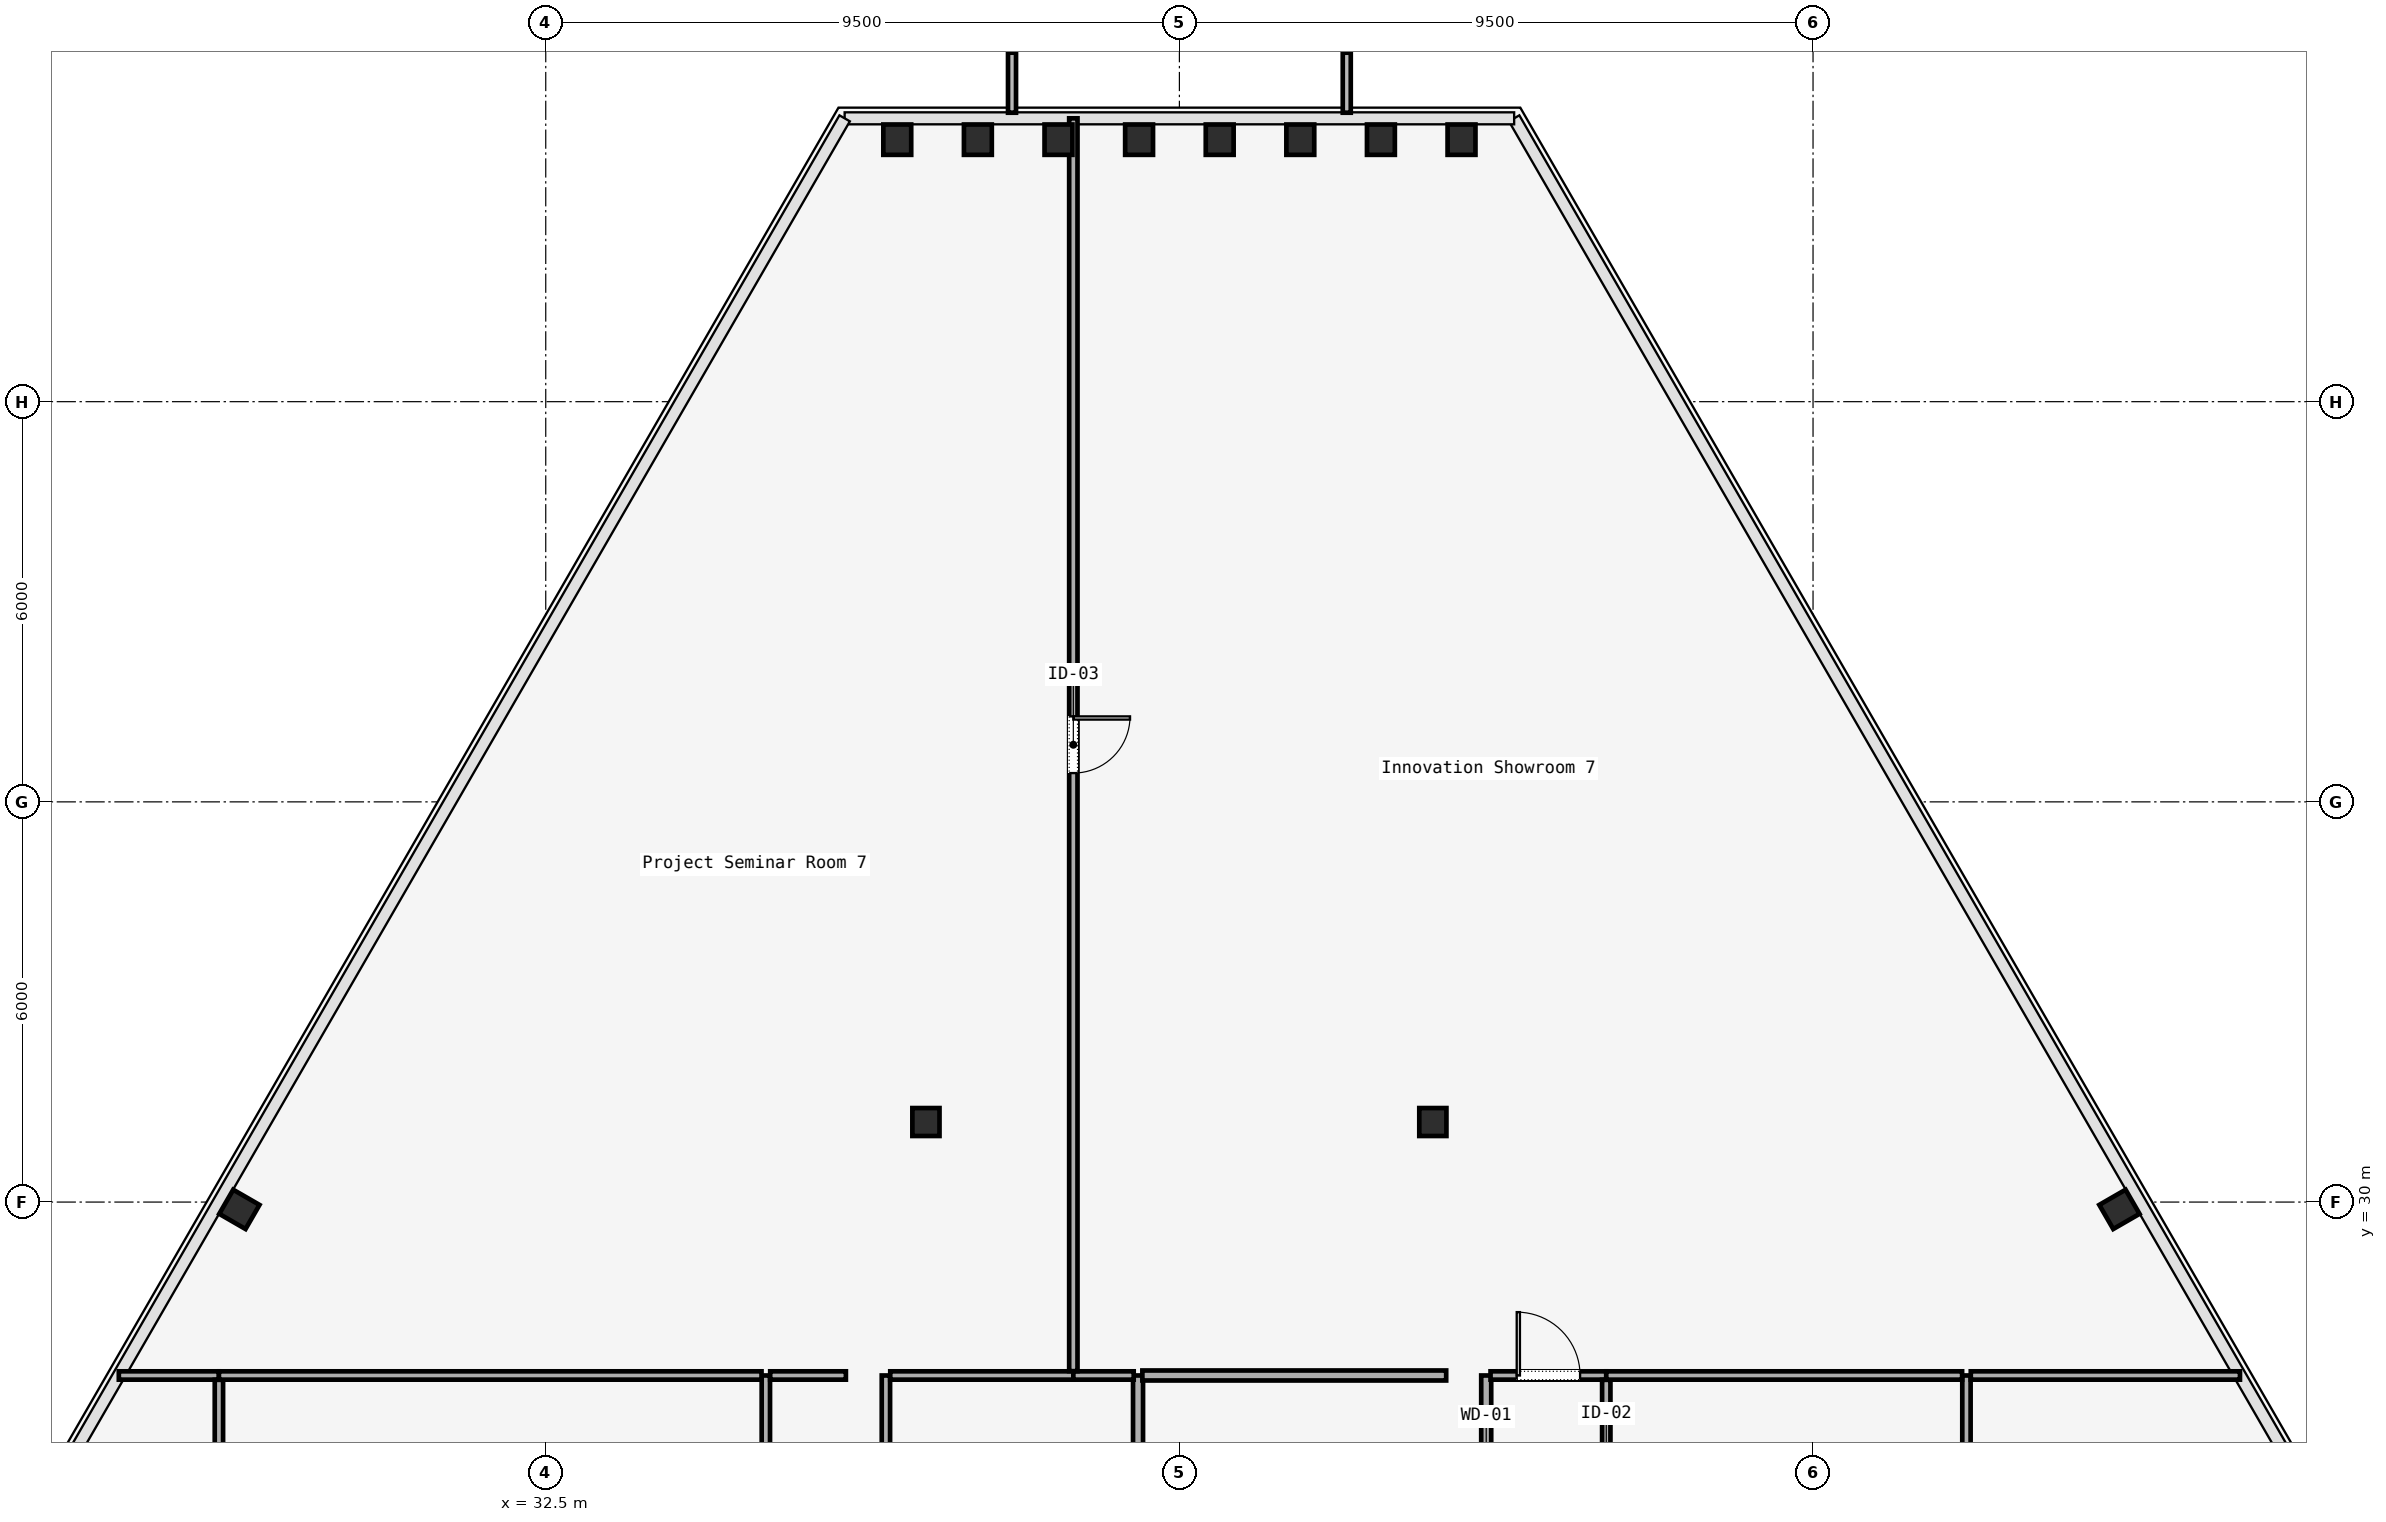
"""IFC4 building model, lengths in metres.
Left out: names, types, materials, properties, quantities, classifications, styles, units other than length and angle.
Written with IfcOpenShell. Run it as: python <this file> out.ifc"""

import sys

from ifc_helpers import new_model, si_unit, direction, frame, frame_2d, origin, origin_2d, place, context, subcontext, project, spatial, rectangle, i_section, extrude, element, fill, save


model = new_model("IFC4")
c1 = context("Model", 3, precision=1e-05, world=origin(), true_north=direction((0.0, 1.0)))
c2 = subcontext(c1, "Body", "Model", "MODEL_VIEW")
j1 = project(units=[si_unit("LENGTHUNIT", "METRE"), si_unit("PLANEANGLEUNIT", "RADIAN")], contexts=[c1])
p1 = place(None, origin())
s1 = spatial("IfcSite", under=j1, at=p1, CompositionType="ELEMENT")
p2 = place(p1, origin())
s2 = spatial("IfcBuilding", under=s1, at=p2, CompositionType="ELEMENT")
p3 = place(p2, frame((0.0, 0.0, 176.4)))
s3 = spatial("IfcBuildingStorey", under=s2, at=p3, CompositionType="ELEMENT", Elevation=176.4)
for number, where, z_axis, x_axis in (
    (1, (38.2, 31.2, 0.0), (0.0, 0.0, 1.0), (1.0, 0.0, 0.0)),
    (2, (45.8, 31.2, 0.0), (0.0, 0.0, 1.0), (1.0, 0.0, 0.0)),
):
    element("IfcColumn", number, at=place(p3, frame(where, z_axis=z_axis, x_axis=x_axis)), inside=s3, PredefinedType="COLUMN", context=c2, shape_type="SweptSolid", body=[
        extrude(i_section(OverallWidth=0.407, OverallDepth=0.419, WebThickness=0.031, FlangeThickness=0.049, FilletRadius=0.015, at=origin_2d()), origin(), (0.0, 0.0, 1.0), 3.58),
    ])
for number, where, z_axis, x_axis in (
    (3, (56.094, 29.89, 0.0), (0.0, 0.0, 1.0), (-0.5, 0.866, 0.0)),
    (4, (46.23, 45.928, 0.0), (0.0, 0.0, 1.0), (1.0, 0.0, 0.0)),
    (5, (45.021, 45.928, 0.0), (0.0, 0.0, 1.0), (1.0, 0.0, 0.0)),
    (6, (43.813, 45.928, 0.0), (0.0, 0.0, 1.0), (1.0, 0.0, 0.0)),
    (7, (42.604, 45.928, 0.0), (0.0, 0.0, 1.0), (1.0, 0.0, 0.0)),
    (8, (41.396, 45.928, 0.0), (0.0, 0.0, 1.0), (1.0, 0.0, 0.0)),
    (9, (40.187, 45.928, 0.0), (0.0, 0.0, 1.0), (1.0, 0.0, 0.0)),
    (10, (38.979, 45.928, 0.0), (0.0, 0.0, 1.0), (1.0, 0.0, 0.0)),
    (11, (37.77, 45.928, 0.0), (0.0, 0.0, 1.0), (1.0, 0.0, 0.0)),
    (12, (27.906, 29.89, 0.0), (0.0, 0.0, 1.0), (0.5, 0.866, 0.0)),
):
    element("IfcColumn", number, at=place(p3, frame(where, z_axis=z_axis, x_axis=x_axis)), inside=s3, PredefinedType="COLUMN", context=c2, shape_type="SweptSolid", body=[
        extrude(i_section(OverallWidth=0.418, OverallDepth=0.455, WebThickness=0.042, FlangeThickness=0.052, FilletRadius=0.015, at=origin_2d()), origin(), (0.0, 0.0, 1.0), 3.58),
    ])
p4 = place(p3, frame((35.8, 24.083, 0.0), z_axis=(0.0, 0.0, 1.0), x_axis=(0.0, 1.0, 0.0)))
e13 = element("IfcWall", 13, at=p4, inside=s3, PredefinedType="PARTITIONING", context=c2, shape_type="SweptSolid", body=[
    extrude(rectangle(XDim=3.317, YDim=0.125, at=frame_2d((1.659, 0.0))), origin(), (0.0, 0.0, 1.0), 3.01),
])
p5 = place(p4, frame((1.184, 0.0, 0.0)))
e14 = element("IfcOpeningElement", 14, at=p5, cuts=e13, PredefinedType="OPENING", context=c2, shape_type="SweptSolid", body=[
    extrude(rectangle(XDim=0.95, YDim=2.2, at=frame_2d((0.475, 1.1))), frame((0.0, 0.062, 0.0), z_axis=(0.0, -1.0, 0.0), x_axis=(1.0, 0.0, 0.0)), (0.0, 0.0, 1.0), 0.125),
])
p6 = place(p3, frame((35.865, 27.4, 0.0), z_axis=(0.0, 0.0, 1.0), x_axis=(1.0, 0.0, 0.0)))
e15 = element("IfcWall", 15, at=p6, inside=s3, PredefinedType="PARTITIONING", context=c2, shape_type="SweptSolid", body=[
    extrude(rectangle(XDim=1.135, YDim=0.125, at=frame_2d((0.567, 0.0))), origin(), (0.0, 0.0, 1.0), 3.01),
])
p7 = place(p3, frame((37.6, 27.4, 0.0), z_axis=(0.0, 0.0, 1.0), x_axis=(0.0, -1.0, 0.0)))
e16 = element("IfcWall", 16, at=p7, inside=s3, PredefinedType="PARTITIONING", context=c2, shape_type="SweptSolid", body=[
    extrude(rectangle(XDim=5.72, YDim=0.125, at=frame_2d((2.86, 0.0))), origin(), (0.0, 0.0, 1.0), 3.01),
])
p8 = place(p7, frame((2.385, 0.0, 0.0)))
e17 = element("IfcOpeningElement", 17, at=p8, cuts=e16, PredefinedType="OPENING", context=c2, shape_type="SweptSolid", body=[
    extrude(rectangle(XDim=0.95, YDim=2.2, at=frame_2d((0.475, 1.1))), frame((0.0, 0.062, 0.0), z_axis=(0.0, -1.0, 0.0), x_axis=(1.0, 0.0, 0.0)), (0.0, 0.0, 1.0), 0.125),
])
p9 = place(p3, frame((46.6, 24.083, 0.0), z_axis=(0.0, 0.0, 1.0), x_axis=(0.0, 1.0, 0.0)))
e18 = element("IfcWall", 18, at=p9, inside=s3, PredefinedType="PARTITIONING", context=c2, shape_type="SweptSolid", body=[
    extrude(rectangle(XDim=3.317, YDim=0.15, at=frame_2d((1.659, 0.0))), origin(), (0.0, 0.0, 1.0), 3.01),
])
p10 = place(p9, frame((1.209, 0.0, 0.0)))
e19 = element("IfcOpeningElement", 19, at=p10, cuts=e18, PredefinedType="OPENING", context=c2, shape_type="SweptSolid", body=[
    extrude(rectangle(XDim=0.9, YDim=2.15, at=frame_2d((0.45, 1.075))), frame((0.0, 0.075, 0.0), z_axis=(0.0, -1.0, 0.0), x_axis=(1.0, 0.0, 0.0)), (0.0, 0.0, 1.0), 0.15),
])
p11 = place(p3, frame((46.665, 27.4, 0.0), z_axis=(0.0, 0.0, 1.0), x_axis=(1.0, 0.0, 0.0)))
e20 = element("IfcWall", 20, at=p11, inside=s3, PredefinedType="PARTITIONING", context=c2, shape_type="SweptSolid", body=[
    extrude(rectangle(XDim=1.735, YDim=0.125, at=frame_2d((0.867, 0.0))), origin(), (0.0, 0.0, 1.0), 3.01),
])
p12 = place(p11, frame((0.393, 0.0, 0.0)))
e21 = element("IfcOpeningElement", 21, at=p12, cuts=e20, PredefinedType="OPENING", context=c2, shape_type="SweptSolid", body=[
    extrude(rectangle(XDim=0.95, YDim=2.2, at=frame_2d((0.475, 1.1))), frame((0.0, 0.062, 0.0), z_axis=(0.0, -1.0, 0.0), x_axis=(1.0, 0.0, 0.0)), (0.0, 0.0, 1.0), 0.125),
])
p13 = place(p3, frame((48.4, 27.335, 0.0), z_axis=(0.0, 0.0, 1.0), x_axis=(0.0, -1.0, 0.0)))
e22 = element("IfcWall", 22, at=p13, inside=s3, PredefinedType="PARTITIONING", context=c2, shape_type="SweptSolid", body=[
    extrude(rectangle(XDim=3.805, YDim=0.125, at=frame_2d((1.902, 0.0))), origin(), (0.0, 0.0, 1.0), 3.01),
])
p14 = place(p13, frame((1.202, 0.0, 0.0)))
e23 = element("IfcOpeningElement", 23, at=p14, cuts=e22, PredefinedType="OPENING", context=c2, shape_type="SweptSolid", body=[
    extrude(rectangle(XDim=1.4, YDim=2.2, at=frame_2d((0.7, 1.1))), frame((0.0, 0.062, 0.0), z_axis=(0.0, -1.0, 0.0), x_axis=(1.0, 0.0, 0.0)), (0.0, 0.0, 1.0), 0.125),
])
p15 = place(p3, frame((26.099, 27.4, 0.0), z_axis=(0.0, 0.0, 1.0), x_axis=(1.0, 0.0, 0.0)))
e24 = element("IfcWall", 24, at=p15, inside=s3, PredefinedType="PARTITIONING", context=c2, shape_type="SweptSolid", body=[
    extrude(rectangle(XDim=1.501, YDim=0.125, at=frame_2d((0.75, 0.0))), origin(), (0.0, 0.0, 1.0), 3.01),
])
p16 = place(p3, frame((27.6, 27.335, 0.0), z_axis=(0.0, 0.0, 1.0), x_axis=(0.0, -1.0, 0.0)))
e25 = element("IfcWall", 25, at=p16, inside=s3, PredefinedType="PARTITIONING", context=c2, shape_type="SweptSolid", body=[
    extrude(rectangle(XDim=3.252, YDim=0.125, at=frame_2d((1.626, 0.0))), origin(), (0.0, 0.0, 1.0), 3.01),
])
p17 = place(p3, frame((53.8, 23.53, 0.0), z_axis=(0.0, 0.0, 1.0), x_axis=(0.0, 1.0, 0.0)))
e26 = element("IfcWall", 26, at=p17, inside=s3, PredefinedType="PARTITIONING", context=c2, shape_type="SweptSolid", body=[
    extrude(rectangle(XDim=3.87, YDim=0.125, at=frame_2d((1.935, 0.0))), origin(), (0.0, 0.0, 1.0), 3.01),
])
p18 = place(p3, frame((53.865, 27.4, 0.0), z_axis=(0.0, 0.0, 1.0), x_axis=(1.0, 0.0, 0.0)))
e27 = element("IfcWall", 27, at=p18, inside=s3, PredefinedType="PARTITIONING", context=c2, shape_type="SweptSolid", body=[
    extrude(rectangle(XDim=4.036, YDim=0.125, at=frame_2d((2.018, 0.0))), origin(), (0.0, 0.0, 1.0), 3.01),
])
p19 = place(p3, frame((41.38, 27.4, 0.0), z_axis=(0.0, 0.0, 1.0), x_axis=(0.0, -1.0, 0.0)))
e28 = element("IfcWall", 28, at=p19, inside=s3, PredefinedType="PARTITIONING", context=c2, shape_type="SweptSolid", body=[
    extrude(rectangle(XDim=3.317, YDim=0.15, at=frame_2d((1.659, 0.0))), origin(), (0.0, 0.0, 1.0), 3.01),
])
p20 = place(p3, frame((37.665, 27.4, 0.0), z_axis=(0.0, 0.0, 1.0), x_axis=(1.0, 0.0, 0.0)))
e29 = element("IfcWall", 29, at=p20, inside=s3, PredefinedType="PARTITIONING", context=c2, shape_type="SweptSolid", body=[
    extrude(rectangle(XDim=2.745, YDim=0.125, at=frame_2d((1.373, 0.0))), origin(), (0.0, 0.0, 1.0), 3.01),
])
p21 = place(p3, frame((40.41, 27.4, 0.0), z_axis=(0.0, 0.0, 1.0), x_axis=(1.0, 0.0, 0.0)))
e30 = element("IfcWall", 30, at=p21, inside=s3, PredefinedType="PARTITIONING", context=c2, shape_type="SweptSolid", body=[
    extrude(rectangle(XDim=0.905, YDim=0.125, at=frame_2d((0.453, 0.0))), origin(), (0.0, 0.0, 1.0), 3.01),
])
p22 = place(p3, frame((48.4, 27.4, 0.0), z_axis=(0.0, 0.0, 1.0), x_axis=(1.0, 0.0, 0.0)))
e31 = element("IfcWall", 31, at=p22, inside=s3, PredefinedType="PARTITIONING", context=c2, shape_type="SweptSolid", body=[
    extrude(rectangle(XDim=5.335, YDim=0.125, at=frame_2d((2.667, 0.0))), origin(), (0.0, 0.0, 1.0), 3.01),
])
p23 = place(p3, frame((27.6, 27.4, 0.0), z_axis=(0.0, 0.0, 1.0), x_axis=(1.0, 0.0, 0.0)))
e32 = element("IfcWall", 32, at=p23, inside=s3, PredefinedType="PARTITIONING", context=c2, shape_type="SweptSolid", body=[
    extrude(rectangle(XDim=8.135, YDim=0.125, at=frame_2d((4.067, 0.0))), origin(), (0.0, 0.0, 1.0), 3.01),
])
p24 = place(p3, frame((41.445, 27.4, 0.0), z_axis=(0.0, 0.0, 1.0), x_axis=(1.0, 0.0, 0.0)))
e33 = element("IfcWall", 33, at=p24, inside=s3, PredefinedType="PARTITIONING", context=c2, shape_type="SweptSolid", body=[
    extrude(rectangle(XDim=4.555, YDim=0.15, at=frame_2d((2.277, 0.0))), origin(), (0.0, 0.0, 1.0), 3.01),
])
p25 = place(p3, frame((40.41, 46.248, 0.0), z_axis=(0.0, 0.0, 1.0), x_axis=(0.0, -1.0, 0.0)))
e34 = element("IfcWall", 34, at=p25, inside=s3, PredefinedType="PARTITIONING", context=c2, shape_type="SweptSolid", body=[
    extrude(rectangle(XDim=18.783, YDim=0.125, at=frame_2d((9.392, 0.0))), origin(), (0.0, 0.0, 1.0), 3.01),
])
p26 = place(p25, frame((8.967, 0.0, 0.0)))
e35 = element("IfcOpeningElement", 35, at=p26, cuts=e34, PredefinedType="OPENING", context=c2, shape_type="SweptSolid", body=[
    extrude(rectangle(XDim=0.85, YDim=2.15, at=frame_2d((0.425, 1.075))), frame((0.0, 0.062, 0.0), z_axis=(0.0, -1.0, 0.0), x_axis=(1.0, 0.0, 0.0)), (0.0, 0.0, 1.0), 0.125),
])
p27 = place(p26, origin())
e36 = element("IfcDoor", 36, at=p27, inside=s3, OperationType="SINGLE_SWING_LEFT", PredefinedType="DOOR", context=c2, shape_type="SweptSolid", body=[
    extrude(rectangle(XDim=0.85, YDim=2.15, at=frame_2d((0.425, 1.075))), frame((0.0, 0.025, 0.0), z_axis=(0.0, -1.0, 0.0), x_axis=(1.0, 0.0, 0.0)), (0.0, 0.0, 1.0), 0.05),
])
fill(e35, e36)
p28 = place(p12, origin())
e37 = element("IfcDoor", 37, at=p28, inside=s3, OperationType="SINGLE_SWING_RIGHT", PredefinedType="DOOR", context=c2, shape_type="SweptSolid", body=[
    extrude(rectangle(XDim=0.95, YDim=2.2, at=frame_2d((0.475, 1.1))), frame((0.0, 0.025, 0.0), z_axis=(0.0, -1.0, 0.0), x_axis=(1.0, 0.0, 0.0)), (0.0, 0.0, 1.0), 0.05),
])
fill(e21, e37)
save(model, sys.argv[1])
